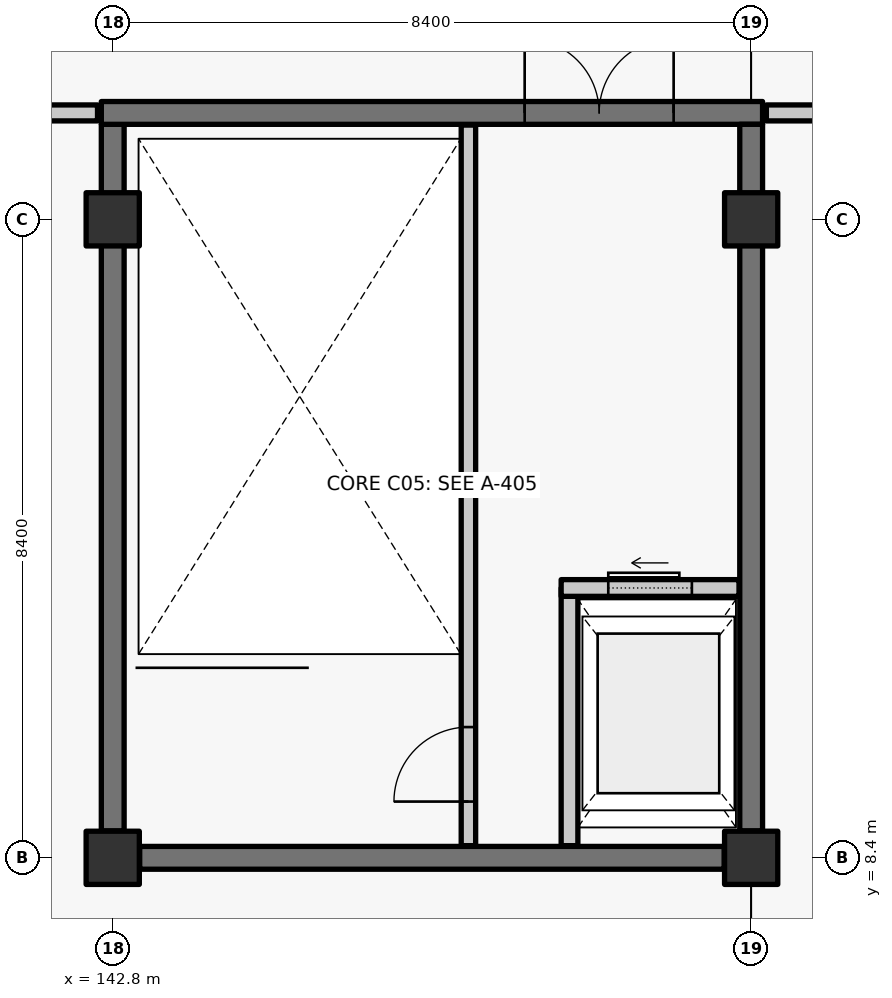
"""IFC4 building model, lengths in metres.
Left out: names, types, materials, properties, quantities, classifications, styles, units other than length and angle.
Written with IfcOpenShell. Run it as: python <this file> out.ifc"""

import sys

from ifc_helpers import new_model, si_unit, direction, frame, frame_2d, origin, origin_2d, place, context, subcontext, project, spatial, rectangle, extrude, element, fill, save


model = new_model("IFC4")
c1 = context("Model", 3, precision=1e-05, world=origin(), true_north=direction((0.0, 1.0)))
c2 = subcontext(c1, "Body", "Model", "MODEL_VIEW")
j1 = project(units=[si_unit("LENGTHUNIT", "METRE"), si_unit("PLANEANGLEUNIT", "RADIAN")], contexts=[c1])
p1 = place(None, origin())
s1 = spatial("IfcSite", under=j1, at=p1, CompositionType="ELEMENT")
p2 = place(p1, origin())
s2 = spatial("IfcBuilding", under=s1, at=p2, CompositionType="ELEMENT")
p3 = place(p2, frame((0.0, 0.0, 11.4)))
s3 = spatial("IfcBuildingStorey", under=s2, at=p3, CompositionType="ELEMENT", Elevation=11.4)
for number, where, z_axis, x_axis in (
    (1, (142.8, 8.4, 0.0), (0.0, 0.0, 1.0), (1.0, 0.0, 0.0)),
    (2, (142.8, 16.8, 0.0), (0.0, 0.0, 1.0), (1.0, 0.0, 0.0)),
    (3, (151.2, 8.4, 0.0), (0.0, 0.0, 1.0), (1.0, 0.0, 0.0)),
    (4, (151.2, 16.8, 0.0), (0.0, 0.0, 1.0), (1.0, 0.0, 0.0)),
):
    element("IfcColumn", number, at=place(p3, frame(where, z_axis=z_axis, x_axis=x_axis)), inside=s3, PredefinedType="COLUMN", context=c2, shape_type="SweptSolid", body=[
        extrude(rectangle(XDim=0.7, YDim=0.7, at=origin_2d()), origin(), (0.0, 0.0, 1.0), 4.8),
    ])
p4 = place(p3, frame((150.845, 8.4, 0.0), z_axis=(0.0, 0.0, 1.0), x_axis=(-1.0, 0.0, 0.0)))
e5 = element("IfcWall", 5, at=p4, inside=s3, PredefinedType="SHEAR", context=c2, shape_type="SweptSolid", body=[
    extrude(rectangle(XDim=7.69, YDim=0.3, at=frame_2d((3.845, 0.0))), origin(), (0.0, 0.0, 1.0), 4.52),
])
p5 = place(p3, frame((142.8, 8.755, 0.0), z_axis=(0.0, 0.0, 1.0), x_axis=(0.0, 1.0, 0.0)))
e6 = element("IfcWall", 6, at=p5, inside=s3, PredefinedType="SHEAR", context=c2, shape_type="SweptSolid", body=[
    extrude(rectangle(XDim=9.295, YDim=0.3, at=frame_2d((4.647, 0.0))), origin(), (0.0, 0.0, 1.0), 4.52),
])
p6 = place(p3, frame((142.65, 18.2, 0.0), z_axis=(0.0, 0.0, 1.0), x_axis=(1.0, 0.0, 0.0)))
e7 = element("IfcWall", 7, at=p6, inside=s3, PredefinedType="SHEAR", context=c2, shape_type="SweptSolid", body=[
    extrude(rectangle(XDim=8.7, YDim=0.3, at=frame_2d((4.35, 0.0))), origin(), (0.0, 0.0, 1.0), 4.52),
])
p7 = place(p6, frame((5.57, 0.0, 0.0)))
e8 = element("IfcOpeningElement", 8, at=p7, cuts=e7, PredefinedType="OPENING", context=c2, shape_type="SweptSolid", body=[
    extrude(rectangle(XDim=1.96, YDim=2.2, at=frame_2d((0.98, 1.1))), frame((0.0, 0.16, 0.0), z_axis=(0.0, -1.0, 0.0), x_axis=(1.0, 0.0, 0.0)), (0.0, 0.0, 1.0), 0.32),
])
p8 = place(p3, frame((151.2, 18.05, 0.0), z_axis=(0.0, 0.0, 1.0), x_axis=(0.0, -1.0, 0.0)))
e9 = element("IfcWall", 9, at=p8, inside=s3, PredefinedType="SHEAR", context=c2, shape_type="SweptSolid", body=[
    extrude(rectangle(XDim=9.295, YDim=0.3, at=frame_2d((4.647, 0.0))), origin(), (0.0, 0.0, 1.0), 4.52),
])
p9 = place(p3, frame((147.48, 8.56, 0.0), z_axis=(0.0, 0.0, 1.0), x_axis=(0.0, 1.0, 0.0)))
e10 = element("IfcWall", 10, at=p9, inside=s3, PredefinedType="SOLIDWALL", context=c2, shape_type="SweptSolid", body=[
    extrude(rectangle(XDim=9.48, YDim=0.19, at=frame_2d((4.74, 0.0))), origin(), (0.0, 0.0, 1.0), 4.52),
])
p10 = place(p9, frame((0.58, 0.0, 0.0)))
e11 = element("IfcOpeningElement", 11, at=p10, cuts=e10, PredefinedType="OPENING", context=c2, shape_type="SweptSolid", body=[
    extrude(rectangle(XDim=0.98, YDim=2.15, at=frame_2d((0.49, 1.075))), frame((0.0, 0.105, 0.0), z_axis=(0.0, -1.0, 0.0), x_axis=(1.0, 0.0, 0.0)), (0.0, 0.0, 1.0), 0.21),
])
p11 = place(p3, frame((148.81, 8.56, 0.0), z_axis=(0.0, 0.0, 1.0), x_axis=(0.0, 1.0, 0.0)))
e12 = element("IfcWall", 12, at=p11, inside=s3, PredefinedType="SOLIDWALL", context=c2, shape_type="SweptSolid", body=[
    extrude(rectangle(XDim=3.39, YDim=0.22, at=frame_2d((1.695, 0.0))), origin(), (0.0, 0.0, 1.0), 4.52),
])
p12 = place(p3, frame((148.7, 11.95, 0.0), z_axis=(0.0, 0.0, 1.0), x_axis=(1.0, 0.0, 0.0)))
e13 = element("IfcWall", 13, at=p12, inside=s3, PredefinedType="SOLIDWALL", context=c2, shape_type="SweptSolid", body=[
    extrude(rectangle(XDim=2.34, YDim=0.22, at=frame_2d((1.17, 0.0))), origin(), (0.0, 0.0, 1.0), 4.52),
])
p13 = place(p12, frame((0.62, 0.0, 0.0)))
e14 = element("IfcOpeningElement", 14, at=p13, cuts=e13, PredefinedType="OPENING", context=c2, shape_type="SweptSolid", body=[
    extrude(rectangle(XDim=1.1, YDim=2.2, at=frame_2d((0.55, 1.1))), frame((0.0, 0.12, 0.0), z_axis=(0.0, -1.0, 0.0), x_axis=(1.0, 0.0, 0.0)), (0.0, 0.0, 1.0), 0.24),
])
p14 = place(p3, frame((126.2, 18.2, 0.0), z_axis=(0.0, 0.0, 1.0), x_axis=(1.0, 0.0, 0.0)))
e15 = element("IfcWall", 15, at=p14, inside=s3, PredefinedType="PARTITIONING", context=c2, shape_type="SweptSolid", body=[
    extrude(rectangle(XDim=16.4, YDim=0.21, at=frame_2d((8.2, 0.0))), origin(), (0.0, 0.0, 1.0), 4.55),
])
p15 = place(p14, frame((3.5, 0.0, 0.0)))
e16 = element("IfcOpeningElement", 16, at=p15, cuts=e15, PredefinedType="OPENING", context=c2, shape_type="SweptSolid", body=[
    extrude(rectangle(XDim=1.0, YDim=2.15, at=frame_2d((0.5, 1.075))), frame((0.0, 0.115, 0.0), z_axis=(0.0, -1.0, 0.0), x_axis=(1.0, 0.0, 0.0)), (0.0, 0.0, 1.0), 0.23),
])
p16 = place(p14, frame((11.9, 0.0, 0.0)))
e17 = element("IfcOpeningElement", 17, at=p16, cuts=e15, PredefinedType="OPENING", context=c2, shape_type="SweptSolid", body=[
    extrude(rectangle(XDim=1.0, YDim=2.15, at=frame_2d((0.5, 1.075))), frame((0.0, 0.115, 0.0), z_axis=(0.0, -1.0, 0.0), x_axis=(1.0, 0.0, 0.0)), (0.0, 0.0, 1.0), 0.23),
])
p17 = place(p3, frame((151.4, 18.2, 0.0), z_axis=(0.0, 0.0, 1.0), x_axis=(1.0, 0.0, 0.0)))
e18 = element("IfcWall", 18, at=p17, inside=s3, PredefinedType="PARTITIONING", context=c2, shape_type="SweptSolid", body=[
    extrude(rectangle(XDim=33.2, YDim=0.21, at=frame_2d((16.6, 0.0))), origin(), (0.0, 0.0, 1.0), 4.55),
])
p18 = place(p17, frame((3.5, 0.0, 0.0)))
e19 = element("IfcOpeningElement", 19, at=p18, cuts=e18, PredefinedType="OPENING", context=c2, shape_type="SweptSolid", body=[
    extrude(rectangle(XDim=1.0, YDim=2.15, at=frame_2d((0.5, 1.075))), frame((0.0, 0.115, 0.0), z_axis=(0.0, -1.0, 0.0), x_axis=(1.0, 0.0, 0.0)), (0.0, 0.0, 1.0), 0.23),
])
p19 = place(p17, frame((28.7, 0.0, 0.0)))
e20 = element("IfcOpeningElement", 20, at=p19, cuts=e18, PredefinedType="OPENING", context=c2, shape_type="SweptSolid", body=[
    extrude(rectangle(XDim=1.0, YDim=2.15, at=frame_2d((0.5, 1.075))), frame((0.0, 0.115, 0.0), z_axis=(0.0, -1.0, 0.0), x_axis=(1.0, 0.0, 0.0)), (0.0, 0.0, 1.0), 0.23),
])
p20 = place(p10, origin())
e21 = element("IfcDoor", 21, at=p20, inside=s3, OperationType="SINGLE_SWING_LEFT", PredefinedType="DOOR", context=c2, shape_type="SweptSolid", body=[
    extrude(rectangle(XDim=0.98, YDim=2.15, at=frame_2d((0.49, 1.075))), frame((0.0, 0.025, 0.0), z_axis=(0.0, -1.0, 0.0), x_axis=(1.0, 0.0, 0.0)), (0.0, 0.0, 1.0), 0.05),
])
fill(e11, e21)
p21 = place(p7, origin())
e22 = element("IfcDoor", 22, at=p21, inside=s3, OperationType="DOUBLE_DOOR_SINGLE_SWING", PredefinedType="DOOR", context=c2, shape_type="SweptSolid", body=[
    extrude(rectangle(XDim=1.96, YDim=2.2, at=frame_2d((0.98, 1.1))), frame((0.0, 0.025, 0.0), z_axis=(0.0, -1.0, 0.0), x_axis=(1.0, 0.0, 0.0)), (0.0, 0.0, 1.0), 0.05),
])
fill(e8, e22)
p22 = place(p13, origin())
e23 = element("IfcDoor", 23, at=p22, inside=s3, OperationType="SLIDING_TO_LEFT", PredefinedType="DOOR", context=c2, shape_type="SweptSolid", body=[
    extrude(rectangle(XDim=1.1, YDim=2.2, at=frame_2d((0.55, 1.1))), frame((0.0, 0.025, 0.0), z_axis=(0.0, -1.0, 0.0), x_axis=(1.0, 0.0, 0.0)), (0.0, 0.0, 1.0), 0.05),
])
fill(e14, e23)
save(model, sys.argv[1])
